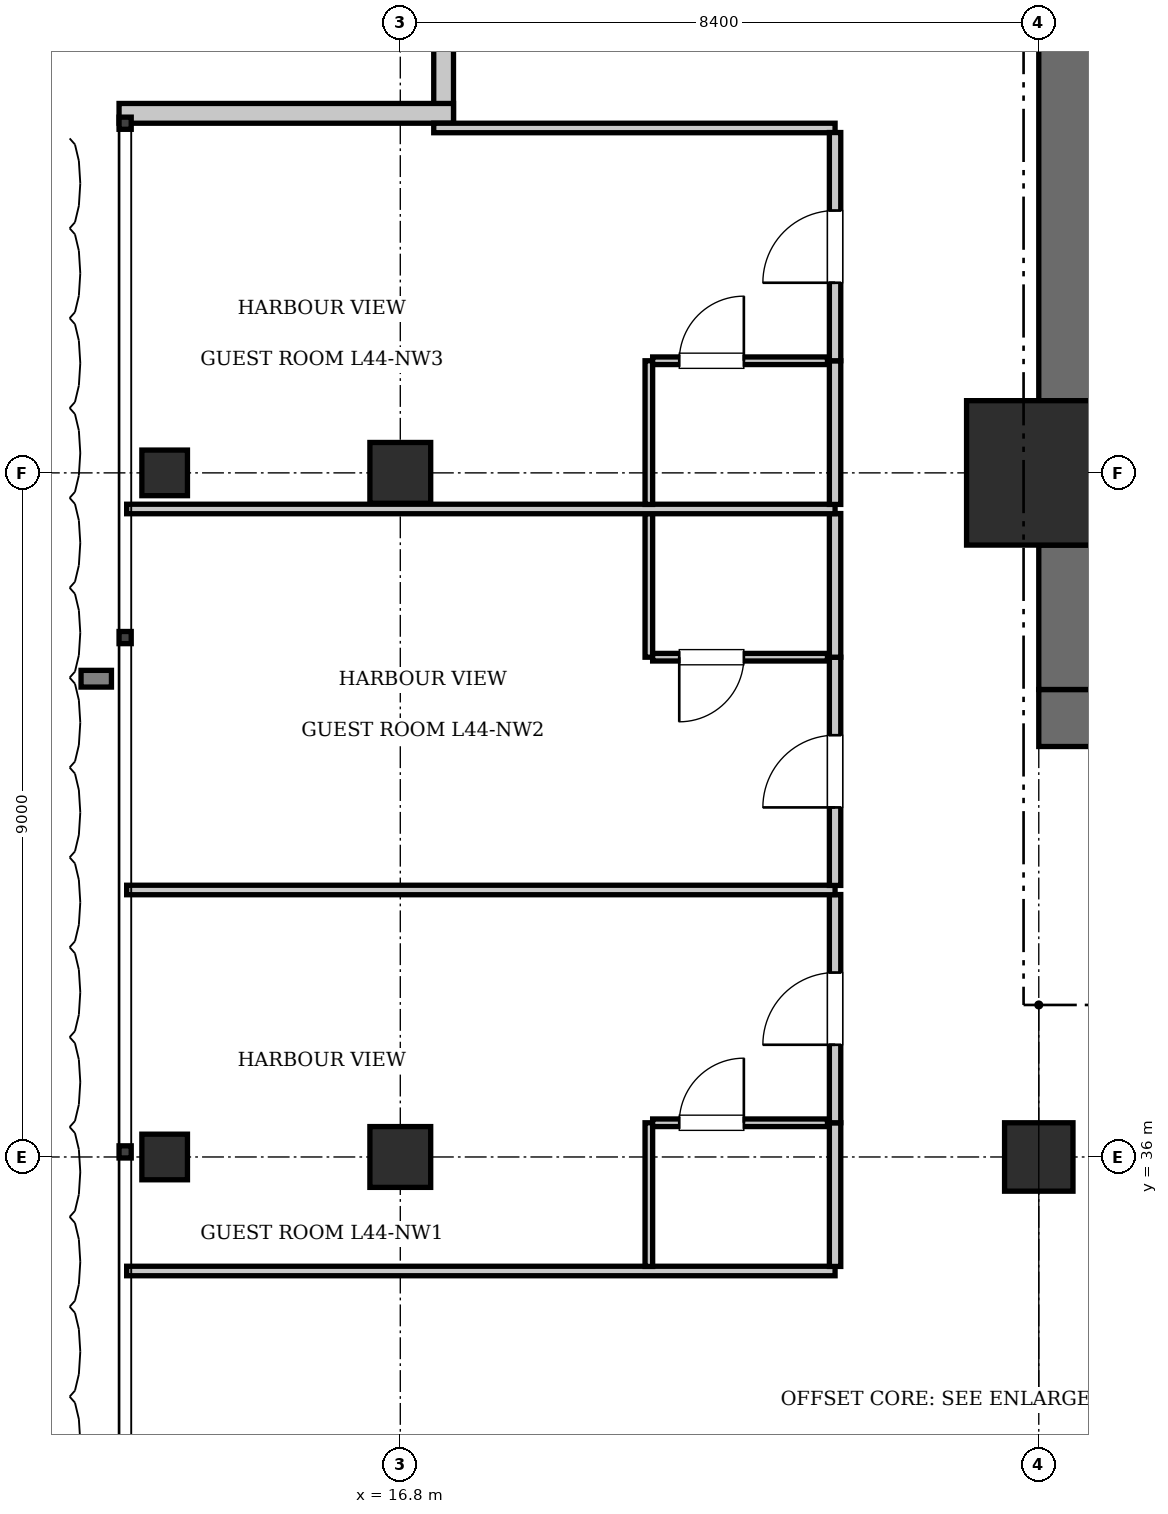
"""IFC4 building model, lengths in metres.
Left out: names, types, materials, properties, quantities, classifications, styles, units other than length and angle.
Written with IfcOpenShell. Run it as: python <this file> out.ifc"""

import sys

from ifc_helpers import new_model, si_unit, direction, frame, frame_2d, origin, origin_2d, place, context, subcontext, project, spatial, rectangle, i_section, extrude, element, fill, save


model = new_model("IFC4")
c1 = context("Model", 3, precision=1e-05, world=origin(), true_north=direction((0.0, 1.0)))
c2 = subcontext(c1, "Body", "Model", "MODEL_VIEW")
j1 = project(units=[si_unit("LENGTHUNIT", "METRE"), si_unit("PLANEANGLEUNIT", "RADIAN")], contexts=[c1])
p1 = place(None, origin())
s1 = spatial("IfcSite", under=j1, at=p1, CompositionType="ELEMENT")
p2 = place(p1, origin())
s2 = spatial("IfcBuilding", under=s1, at=p2, CompositionType="ELEMENT")
p3 = place(p2, frame((0.0, 0.0, 181.3)))
s3 = spatial("IfcBuildingStorey", under=s2, at=p3, CompositionType="ELEMENT", Elevation=181.3)
p4 = place(p3, frame((25.2, 45.0, 0.0), z_axis=(0.0, 0.0, 1.0), x_axis=(1.0, 0.0, 0.0)))
e1 = element("IfcColumn", 1, at=p4, inside=s3, PredefinedType="COLUMN", context=c2, shape_type="SweptSolid", body=[
    extrude(rectangle(XDim=1.9, YDim=1.9, at=origin_2d()), origin(), (0.0, 0.0, 1.0), 3.85),
])
p5 = place(p3, frame((25.2, 41.775, 0.0), z_axis=(0.0, 0.0, 1.0), x_axis=(1.0, 0.0, 0.0)))
e2 = element("IfcWall", 2, at=p5, inside=s3, PredefinedType="SHEAR", context=c2, shape_type="SweptSolid", body=[
    extrude(rectangle(XDim=6.8, YDim=0.75, at=frame_2d((3.4, 0.0))), origin(), (0.0, 0.0, 1.0), 3.85),
])
p6 = place(p5, frame((1.65, 0.0, 0.0)))
e3 = element("IfcOpeningElement", 3, at=p6, cuts=e2, PredefinedType="OPENING", context=c2, shape_type="SweptSolid", body=[
    extrude(rectangle(XDim=1.15, YDim=2.15, at=frame_2d((0.575, 1.075))), frame((0.0, 0.385, 0.0), z_axis=(0.0, -1.0, 0.0), x_axis=(1.0, 0.0, 0.0)), (0.0, 0.0, 1.0), 0.77),
])
p7 = place(p5, frame((5.15, 0.0, 0.0)))
e4 = element("IfcOpeningElement", 4, at=p7, cuts=e2, PredefinedType="OPENING", context=c2, shape_type="SweptSolid", body=[
    extrude(rectangle(XDim=1.1, YDim=2.2, at=frame_2d((0.55, 1.1))), frame((0.0, 0.385, 0.0), z_axis=(0.0, -1.0, 0.0), x_axis=(1.0, 0.0, 0.0)), (0.0, 0.0, 1.0), 0.77),
])
p8 = place(p3, frame((25.575, 42.15, 0.0), z_axis=(0.0, 0.0, 1.0), x_axis=(0.0, 1.0, 0.0)))
e5 = element("IfcWall", 5, at=p8, inside=s3, PredefinedType="SHEAR", context=c2, shape_type="SweptSolid", body=[
    extrude(rectangle(XDim=1.9, YDim=0.75, at=frame_2d((0.95, 0.0))), origin(), (0.0, 0.0, 1.0), 3.85),
])
p9 = place(p3, frame((25.575, 45.95, 0.0), z_axis=(0.0, 0.0, 1.0), x_axis=(0.0, 1.0, 0.0)))
e6 = element("IfcWall", 6, at=p9, inside=s3, PredefinedType="SHEAR", context=c2, shape_type="SweptSolid", body=[
    extrude(rectangle(XDim=7.3, YDim=0.75, at=frame_2d((3.65, 0.0))), origin(), (0.0, 0.0, 1.0), 3.85),
])
p10 = place(p3, frame((25.2, 36.0, 0.0), z_axis=(0.0, 0.0, 1.0), x_axis=(1.0, 0.0, 0.0)))
e7 = element("IfcColumn", 7, at=p10, inside=s3, PredefinedType="COLUMN", context=c2, shape_type="SweptSolid", body=[
    extrude(rectangle(XDim=0.9, YDim=0.9, at=origin_2d()), origin(), (0.0, 0.0, 1.0), 3.85),
])
for number, where, z_axis, x_axis in (
    (8, (16.8, 36.0, 0.0), (0.0, 0.0, 1.0), (1.0, 0.0, 0.0)),
    (9, (16.8, 45.0, 0.0), (0.0, 0.0, 1.0), (1.0, 0.0, 0.0)),
):
    element("IfcColumn", number, at=place(p3, frame(where, z_axis=z_axis, x_axis=x_axis)), inside=s3, PredefinedType="COLUMN", context=c2, shape_type="SweptSolid", body=[
        extrude(rectangle(XDim=0.8, YDim=0.8, at=origin_2d()), origin(), (0.0, 0.0, 1.0), 3.85),
    ])
for number, where, z_axis, x_axis in (
    (10, (13.7, 36.0, 0.0), (0.0, 0.0, 1.0), (1.0, 0.0, 0.0)),
    (11, (13.7, 45.0, 0.0), (0.0, 0.0, 1.0), (1.0, 0.0, 0.0)),
):
    element("IfcColumn", number, at=place(p3, frame(where, z_axis=z_axis, x_axis=x_axis)), inside=s3, PredefinedType="COLUMN", context=c2, shape_type="SweptSolid", body=[
        extrude(i_section(OverallWidth=0.6, OverallDepth=0.6, WebThickness=0.025, FlangeThickness=0.038, at=origin_2d()), origin(), (0.0, 0.0, 1.0), 3.85),
    ])
for number, where, z_axis, x_axis in (
    (12, (17.37, 49.6, 0.0), (0.0, 0.0, 1.0), (0.0, 1.0, 0.0)),
    (13, (13.1, 49.73, 0.0), (0.0, 0.0, 1.0), (1.0, 0.0, 0.0)),
):
    element("IfcWall", number, at=place(p3, frame(where, z_axis=z_axis, x_axis=x_axis)), inside=s3, PredefinedType="SOLIDWALL", context=c2, shape_type="SweptSolid", body=[
        extrude(rectangle(XDim=4.4, YDim=0.26, at=frame_2d((2.2, 0.0))), origin(), (0.0, 0.0, 1.0), 3.61),
    ])
p11 = place(p3, frame((13.2, 34.5, 0.0), z_axis=(0.0, 0.0, 1.0), x_axis=(1.0, 0.0, 0.0)))
e14 = element("IfcWall", 14, at=p11, inside=s3, PredefinedType="PARTITIONING", context=c2, shape_type="SweptSolid", body=[
    extrude(rectangle(XDim=9.32, YDim=0.125, at=frame_2d((4.66, 0.0))), origin(), (0.0, 0.0, 1.0), 3.61),
])
p12 = place(p3, frame((17.24, 49.538, 0.0), z_axis=(0.0, 0.0, 1.0), x_axis=(1.0, 0.0, 0.0)))
e15 = element("IfcWall", 15, at=p12, inside=s3, PredefinedType="PARTITIONING", context=c2, shape_type="SweptSolid", body=[
    extrude(rectangle(XDim=5.28, YDim=0.125, at=frame_2d((2.64, 0.0))), origin(), (0.0, 0.0, 1.0), 3.61),
])
p13 = place(p3, frame((22.52, 34.56, 0.0), z_axis=(0.0, 0.0, 1.0), x_axis=(0.0, 1.0, 0.0)))
e16 = element("IfcWall", 16, at=p13, inside=s3, PredefinedType="PARTITIONING", context=c2, shape_type="SweptSolid", body=[
    extrude(rectangle(XDim=1.89, YDim=0.15, at=frame_2d((0.945, 0.0))), origin(), (0.0, 0.0, 1.0), 3.61),
])
p14 = place(p3, frame((22.52, 36.45, 0.0), z_axis=(0.0, 0.0, 1.0), x_axis=(0.0, 1.0, 0.0)))
e17 = element("IfcWall", 17, at=p14, inside=s3, PredefinedType="PARTITIONING", context=c2, shape_type="SweptSolid", body=[
    extrude(rectangle(XDim=3.002, YDim=0.15, at=frame_2d((1.501, 0.0))), origin(), (0.0, 0.0, 1.0), 3.61),
])
p15 = place(p14, frame((1.026, 0.0, 0.0)))
e18 = element("IfcOpeningElement", 18, at=p15, cuts=e17, PredefinedType="OPENING", context=c2, shape_type="SweptSolid", body=[
    extrude(rectangle(XDim=0.95, YDim=2.15, at=frame_2d((0.475, 1.075))), frame((0.0, 0.085, 0.0), z_axis=(0.0, -1.0, 0.0), x_axis=(1.0, 0.0, 0.0)), (0.0, 0.0, 1.0), 0.17),
])
p16 = place(p3, frame((20.07, 34.56, 0.0), z_axis=(0.0, 0.0, 1.0), x_axis=(0.0, 1.0, 0.0)))
e19 = element("IfcWall", 19, at=p16, inside=s3, PredefinedType="PARTITIONING", context=c2, shape_type="SweptSolid", body=[
    extrude(rectangle(XDim=1.89, YDim=0.1, at=frame_2d((0.945, 0.0))), origin(), (0.0, 0.0, 1.0), 3.61),
])
p17 = place(p3, frame((20.12, 36.45, 0.0), z_axis=(0.0, 0.0, 1.0), x_axis=(1.0, 0.0, 0.0)))
e20 = element("IfcWall", 20, at=p17, inside=s3, PredefinedType="PARTITIONING", context=c2, shape_type="SweptSolid", body=[
    extrude(rectangle(XDim=2.3, YDim=0.1, at=frame_2d((1.15, 0.0))), origin(), (0.0, 0.0, 1.0), 3.61),
])
p18 = place(p17, frame((0.35, 0.0, 0.0)))
e21 = element("IfcOpeningElement", 21, at=p18, cuts=e20, PredefinedType="OPENING", context=c2, shape_type="SweptSolid", body=[
    extrude(rectangle(XDim=0.85, YDim=2.1, at=frame_2d((0.425, 1.05))), frame((0.0, 0.06, 0.0), z_axis=(0.0, -1.0, 0.0), x_axis=(1.0, 0.0, 0.0)), (0.0, 0.0, 1.0), 0.12),
])
p19 = place(p3, frame((13.2, 39.512, 0.0), z_axis=(0.0, 0.0, 1.0), x_axis=(1.0, 0.0, 0.0)))
e22 = element("IfcWall", 22, at=p19, inside=s3, PredefinedType="PARTITIONING", context=c2, shape_type="SweptSolid", body=[
    extrude(rectangle(XDim=9.32, YDim=0.125, at=frame_2d((4.66, 0.0))), origin(), (0.0, 0.0, 1.0), 3.61),
])
p20 = place(p3, frame((22.52, 39.573, 0.0), z_axis=(0.0, 0.0, 1.0), x_axis=(0.0, 1.0, 0.0)))
e23 = element("IfcWall", 23, at=p20, inside=s3, PredefinedType="PARTITIONING", context=c2, shape_type="SweptSolid", body=[
    extrude(rectangle(XDim=3.002, YDim=0.15, at=frame_2d((1.501, 0.0))), origin(), (0.0, 0.0, 1.0), 3.61),
])
p21 = place(p20, frame((1.026, 0.0, 0.0)))
e24 = element("IfcOpeningElement", 24, at=p21, cuts=e23, PredefinedType="OPENING", context=c2, shape_type="SweptSolid", body=[
    extrude(rectangle(XDim=0.95, YDim=2.15, at=frame_2d((0.475, 1.075))), frame((0.0, 0.085, 0.0), z_axis=(0.0, -1.0, 0.0), x_axis=(1.0, 0.0, 0.0)), (0.0, 0.0, 1.0), 0.17),
])
p22 = place(p3, frame((22.52, 42.575, 0.0), z_axis=(0.0, 0.0, 1.0), x_axis=(0.0, 1.0, 0.0)))
e25 = element("IfcWall", 25, at=p22, inside=s3, PredefinedType="PARTITIONING", context=c2, shape_type="SweptSolid", body=[
    extrude(rectangle(XDim=1.89, YDim=0.15, at=frame_2d((0.945, 0.0))), origin(), (0.0, 0.0, 1.0), 3.61),
])
p23 = place(p3, frame((20.07, 42.575, 0.0), z_axis=(0.0, 0.0, 1.0), x_axis=(0.0, 1.0, 0.0)))
e26 = element("IfcWall", 26, at=p23, inside=s3, PredefinedType="PARTITIONING", context=c2, shape_type="SweptSolid", body=[
    extrude(rectangle(XDim=1.89, YDim=0.1, at=frame_2d((0.945, 0.0))), origin(), (0.0, 0.0, 1.0), 3.61),
])
p24 = place(p3, frame((20.12, 42.575, 0.0), z_axis=(0.0, 0.0, 1.0), x_axis=(1.0, 0.0, 0.0)))
e27 = element("IfcWall", 27, at=p24, inside=s3, PredefinedType="PARTITIONING", context=c2, shape_type="SweptSolid", body=[
    extrude(rectangle(XDim=2.3, YDim=0.1, at=frame_2d((1.15, 0.0))), origin(), (0.0, 0.0, 1.0), 3.61),
])
p25 = place(p24, frame((0.35, 0.0, 0.0)))
e28 = element("IfcOpeningElement", 28, at=p25, cuts=e27, PredefinedType="OPENING", context=c2, shape_type="SweptSolid", body=[
    extrude(rectangle(XDim=0.85, YDim=2.1, at=frame_2d((0.425, 1.05))), frame((0.0, 0.06, 0.0), z_axis=(0.0, -1.0, 0.0), x_axis=(1.0, 0.0, 0.0)), (0.0, 0.0, 1.0), 0.12),
])
p26 = place(p3, frame((13.2, 44.525, 0.0), z_axis=(0.0, 0.0, 1.0), x_axis=(1.0, 0.0, 0.0)))
e29 = element("IfcWall", 29, at=p26, inside=s3, PredefinedType="PARTITIONING", context=c2, shape_type="SweptSolid", body=[
    extrude(rectangle(XDim=9.32, YDim=0.125, at=frame_2d((4.66, 0.0))), origin(), (0.0, 0.0, 1.0), 3.61),
])
p27 = place(p3, frame((22.52, 44.585, 0.0), z_axis=(0.0, 0.0, 1.0), x_axis=(0.0, 1.0, 0.0)))
e30 = element("IfcWall", 30, at=p27, inside=s3, PredefinedType="PARTITIONING", context=c2, shape_type="SweptSolid", body=[
    extrude(rectangle(XDim=1.89, YDim=0.15, at=frame_2d((0.945, 0.0))), origin(), (0.0, 0.0, 1.0), 3.61),
])
p28 = place(p3, frame((22.52, 46.475, 0.0), z_axis=(0.0, 0.0, 1.0), x_axis=(0.0, 1.0, 0.0)))
e31 = element("IfcWall", 31, at=p28, inside=s3, PredefinedType="PARTITIONING", context=c2, shape_type="SweptSolid", body=[
    extrude(rectangle(XDim=3.002, YDim=0.15, at=frame_2d((1.501, 0.0))), origin(), (0.0, 0.0, 1.0), 3.61),
])
p29 = place(p28, frame((1.026, 0.0, 0.0)))
e32 = element("IfcOpeningElement", 32, at=p29, cuts=e31, PredefinedType="OPENING", context=c2, shape_type="SweptSolid", body=[
    extrude(rectangle(XDim=0.95, YDim=2.15, at=frame_2d((0.475, 1.075))), frame((0.0, 0.085, 0.0), z_axis=(0.0, -1.0, 0.0), x_axis=(1.0, 0.0, 0.0)), (0.0, 0.0, 1.0), 0.17),
])
p30 = place(p3, frame((20.07, 44.585, 0.0), z_axis=(0.0, 0.0, 1.0), x_axis=(0.0, 1.0, 0.0)))
e33 = element("IfcWall", 33, at=p30, inside=s3, PredefinedType="PARTITIONING", context=c2, shape_type="SweptSolid", body=[
    extrude(rectangle(XDim=1.89, YDim=0.1, at=frame_2d((0.945, 0.0))), origin(), (0.0, 0.0, 1.0), 3.61),
])
p31 = place(p3, frame((20.12, 46.475, 0.0), z_axis=(0.0, 0.0, 1.0), x_axis=(1.0, 0.0, 0.0)))
e34 = element("IfcWall", 34, at=p31, inside=s3, PredefinedType="PARTITIONING", context=c2, shape_type="SweptSolid", body=[
    extrude(rectangle(XDim=2.3, YDim=0.1, at=frame_2d((1.15, 0.0))), origin(), (0.0, 0.0, 1.0), 3.61),
])
p32 = place(p31, frame((0.35, 0.0, 0.0)))
e35 = element("IfcOpeningElement", 35, at=p32, cuts=e34, PredefinedType="OPENING", context=c2, shape_type="SweptSolid", body=[
    extrude(rectangle(XDim=0.85, YDim=2.1, at=frame_2d((0.425, 1.05))), frame((0.0, 0.06, 0.0), z_axis=(0.0, -1.0, 0.0), x_axis=(1.0, 0.0, 0.0)), (0.0, 0.0, 1.0), 0.12),
])
p33 = place(p18, origin())
e36 = element("IfcDoor", 36, at=p33, inside=s3, OperationType="SINGLE_SWING_RIGHT", PredefinedType="DOOR", context=c2, shape_type="SweptSolid", body=[
    extrude(rectangle(XDim=0.85, YDim=2.1, at=frame_2d((0.425, 1.05))), frame((0.0, 0.025, 0.0), z_axis=(0.0, -1.0, 0.0), x_axis=(1.0, 0.0, 0.0)), (0.0, 0.0, 1.0), 0.05),
])
fill(e21, e36)
p34 = place(p15, origin())
e37 = element("IfcDoor", 37, at=p34, inside=s3, OperationType="SINGLE_SWING_LEFT", PredefinedType="DOOR", context=c2, shape_type="SweptSolid", body=[
    extrude(rectangle(XDim=0.95, YDim=2.15, at=frame_2d((0.475, 1.075))), frame((0.0, 0.025, 0.0), z_axis=(0.0, -1.0, 0.0), x_axis=(1.0, 0.0, 0.0)), (0.0, 0.0, 1.0), 0.05),
])
fill(e18, e37)
p35 = place(p25, frame((0.85, 0.0, 0.0), z_axis=(0.0, 0.0, 1.0), x_axis=(-1.0, 0.0, 0.0)))
e38 = element("IfcDoor", 38, at=p35, inside=s3, OperationType="SINGLE_SWING_RIGHT", PredefinedType="DOOR", context=c2, shape_type="SweptSolid", body=[
    extrude(rectangle(XDim=0.85, YDim=2.1, at=frame_2d((0.425, 1.05))), frame((0.0, 0.025, 0.0), z_axis=(0.0, -1.0, 0.0), x_axis=(1.0, 0.0, 0.0)), (0.0, 0.0, 1.0), 0.05),
])
fill(e28, e38)
p36 = place(p21, origin())
e39 = element("IfcDoor", 39, at=p36, inside=s3, OperationType="SINGLE_SWING_LEFT", PredefinedType="DOOR", context=c2, shape_type="SweptSolid", body=[
    extrude(rectangle(XDim=0.95, YDim=2.15, at=frame_2d((0.475, 1.075))), frame((0.0, 0.025, 0.0), z_axis=(0.0, -1.0, 0.0), x_axis=(1.0, 0.0, 0.0)), (0.0, 0.0, 1.0), 0.05),
])
fill(e24, e39)
p37 = place(p32, origin())
e40 = element("IfcDoor", 40, at=p37, inside=s3, OperationType="SINGLE_SWING_RIGHT", PredefinedType="DOOR", context=c2, shape_type="SweptSolid", body=[
    extrude(rectangle(XDim=0.85, YDim=2.1, at=frame_2d((0.425, 1.05))), frame((0.0, 0.025, 0.0), z_axis=(0.0, -1.0, 0.0), x_axis=(1.0, 0.0, 0.0)), (0.0, 0.0, 1.0), 0.05),
])
fill(e35, e40)
p38 = place(p29, origin())
e41 = element("IfcDoor", 41, at=p38, inside=s3, OperationType="SINGLE_SWING_LEFT", PredefinedType="DOOR", context=c2, shape_type="SweptSolid", body=[
    extrude(rectangle(XDim=0.95, YDim=2.15, at=frame_2d((0.475, 1.075))), frame((0.0, 0.025, 0.0), z_axis=(0.0, -1.0, 0.0), x_axis=(1.0, 0.0, 0.0)), (0.0, 0.0, 1.0), 0.05),
])
fill(e32, e41)
save(model, sys.argv[1])
